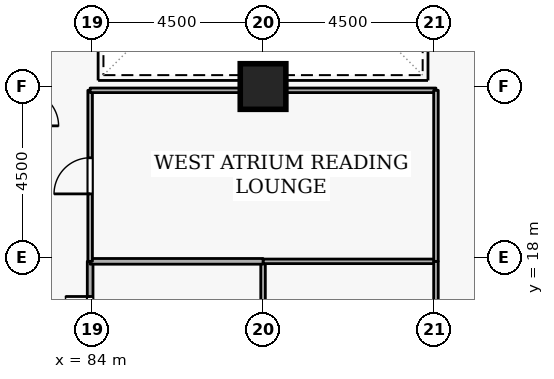
"""IFC4 building model, lengths in metres.
Left out: names, types, materials, properties, quantities, classifications, styles, units other than length and angle.
Written with IfcOpenShell. Run it as: python <this file> out.ifc"""

import sys

from ifc_helpers import new_model, si_unit, direction, frame, frame_2d, origin, origin_2d, place, context, subcontext, project, spatial, rectangle, extrude, element, fill, save


model = new_model("IFC4")
c1 = context("Model", 3, precision=1e-05, world=origin(), true_north=direction((0.0, 1.0)))
c2 = subcontext(c1, "Body", "Model", "MODEL_VIEW")
j1 = project(units=[si_unit("LENGTHUNIT", "METRE"), si_unit("PLANEANGLEUNIT", "RADIAN")], contexts=[c1])
p1 = place(None, origin())
s1 = spatial("IfcSite", under=j1, at=p1, CompositionType="ELEMENT")
p2 = place(p1, origin())
s2 = spatial("IfcBuilding", under=s1, at=p2, CompositionType="ELEMENT")
p3 = place(p2, frame((0.0, 0.0, 134.1)))
s3 = spatial("IfcBuildingStorey", under=s2, at=p3, CompositionType="ELEMENT", Elevation=134.1)
p4 = place(p3, frame((88.5, 22.5, 0.0), z_axis=(0.0, 0.0, 1.0), x_axis=(1.0, 0.0, 0.0)))
e1 = element("IfcColumn", 1, at=p4, inside=s3, PredefinedType="COLUMN", context=c2, shape_type="SweptSolid", body=[
    extrude(rectangle(XDim=1.2, YDim=1.2, at=origin_2d()), origin(), (0.0, 0.0, 1.0), 3.6),
])
p5 = place(p3, frame((88.5, 3.28, 0.0), z_axis=(0.0, 0.0, 1.0), x_axis=(0.0, 1.0, 0.0)))
e2 = element("IfcWall", 2, at=p5, inside=s3, PredefinedType="PARTITIONING", context=c2, shape_type="SweptSolid", body=[
    extrude(rectangle(XDim=14.62, YDim=0.12, at=frame_2d((7.31, 0.0))), origin(), (0.0, 0.0, 1.0), 2.878),
])
p6 = place(p3, frame((88.5, 17.9, 0.0), z_axis=(0.0, 0.0, 1.0), x_axis=(1.0, 0.0, 0.0)))
e3 = element("IfcWall", 3, at=p6, inside=s3, PredefinedType="PARTITIONING", context=c2, shape_type="SweptSolid", body=[
    extrude(rectangle(XDim=4.55, YDim=0.12, at=frame_2d((2.275, 0.0))), origin(), (0.0, 0.0, 1.0), 3.34),
])
p7 = place(p3, frame((93.05, 17.9, 0.0), z_axis=(0.0, 0.0, 1.0), x_axis=(0.0, -1.0, 0.0)))
e4 = element("IfcWall", 4, at=p7, inside=s3, PredefinedType="PARTITIONING", context=c2, shape_type="SweptSolid", body=[
    extrude(rectangle(XDim=1.2, YDim=0.12, at=frame_2d((0.6, 0.0))), origin(), (0.0, 0.0, 1.0), 3.34),
])
p8 = place(p3, frame((83.95, 14.75, 0.0), z_axis=(0.0, 0.0, 1.0), x_axis=(0.0, 1.0, 0.0)))
e5 = element("IfcWall", 5, at=p8, inside=s3, PredefinedType="PARTITIONING", context=c2, shape_type="SweptSolid", body=[
    extrude(rectangle(XDim=3.15, YDim=0.15, at=frame_2d((1.575, 0.0))), origin(), (0.0, 0.0, 1.0), 3.34),
])
p9 = place(p8, frame((0.925, 0.0, 0.0)))
e6 = element("IfcOpeningElement", 6, at=p9, cuts=e5, PredefinedType="OPENING", context=c2, shape_type="SweptSolid", body=[
    extrude(rectangle(XDim=1.3, YDim=2.12, at=frame_2d((0.65, 1.06))), frame((0.0, 0.085, 0.0), z_axis=(0.0, -1.0, 0.0), x_axis=(1.0, 0.0, 0.0)), (0.0, 0.0, 1.0), 0.17),
])
p10 = place(p3, frame((83.95, 17.9, 0.0), z_axis=(0.0, 0.0, 1.0), x_axis=(1.0, 0.0, 0.0)))
e7 = element("IfcWall", 7, at=p10, inside=s3, PredefinedType="PARTITIONING", context=c2, shape_type="SweptSolid", body=[
    extrude(rectangle(XDim=4.55, YDim=0.15, at=frame_2d((2.275, 0.0))), origin(), (0.0, 0.0, 1.0), 3.34),
])
p11 = place(p3, frame((83.95, 17.9, 0.0), z_axis=(0.0, 0.0, 1.0), x_axis=(0.0, 1.0, 0.0)))
e8 = element("IfcWall", 8, at=p11, inside=s3, PredefinedType="PARTITIONING", context=c2, shape_type="SweptSolid", body=[
    extrude(rectangle(XDim=4.5, YDim=0.12, at=frame_2d((2.25, 0.0))), origin(), (0.0, 0.0, 1.0), 3.34),
])
p12 = place(p11, frame((1.775, 0.0, 0.0)))
e9 = element("IfcOpeningElement", 9, at=p12, cuts=e8, PredefinedType="OPENING", context=c2, shape_type="SweptSolid", body=[
    extrude(rectangle(XDim=0.95, YDim=2.1, at=frame_2d((0.475, 1.05))), frame((0.0, 0.07, 0.0), z_axis=(0.0, -1.0, 0.0), x_axis=(1.0, 0.0, 0.0)), (0.0, 0.0, 1.0), 0.14),
])
p13 = place(p3, frame((83.95, 22.4, 0.0), z_axis=(0.0, 0.0, 1.0), x_axis=(1.0, 0.0, 0.0)))
e10 = element("IfcWall", 10, at=p13, inside=s3, PredefinedType="PARTITIONING", context=c2, shape_type="SweptSolid", body=[
    extrude(rectangle(XDim=9.1, YDim=0.12, at=frame_2d((4.55, 0.0))), origin(), (0.0, 0.0, 1.0), 3.34),
])
p14 = place(p3, frame((93.05, 22.4, 0.0), z_axis=(0.0, 0.0, 1.0), x_axis=(0.0, -1.0, 0.0)))
e11 = element("IfcWall", 11, at=p14, inside=s3, PredefinedType="PARTITIONING", context=c2, shape_type="SweptSolid", body=[
    extrude(rectangle(XDim=4.5, YDim=0.12, at=frame_2d((2.25, 0.0))), origin(), (0.0, 0.0, 1.0), 3.34),
])
p15 = place(p9, origin())
e12 = element("IfcDoor", 12, at=p15, inside=s3, OperationType="DOUBLE_DOOR_SINGLE_SWING", PredefinedType="DOOR", context=c2, shape_type="SweptSolid", body=[
    extrude(rectangle(XDim=1.3, YDim=2.12, at=frame_2d((0.65, 1.06))), frame((0.0, 0.025, 0.0), z_axis=(0.0, -1.0, 0.0), x_axis=(1.0, 0.0, 0.0)), (0.0, 0.0, 1.0), 0.05),
])
fill(e6, e12)
p16 = place(p12, origin())
e13 = element("IfcDoor", 13, at=p16, inside=s3, OperationType="SINGLE_SWING_LEFT", PredefinedType="DOOR", context=c2, shape_type="SweptSolid", body=[
    extrude(rectangle(XDim=0.95, YDim=2.1, at=frame_2d((0.475, 1.05))), frame((0.0, 0.025, 0.0), z_axis=(0.0, -1.0, 0.0), x_axis=(1.0, 0.0, 0.0)), (0.0, 0.0, 1.0), 0.05),
])
fill(e9, e13)
save(model, sys.argv[1])
